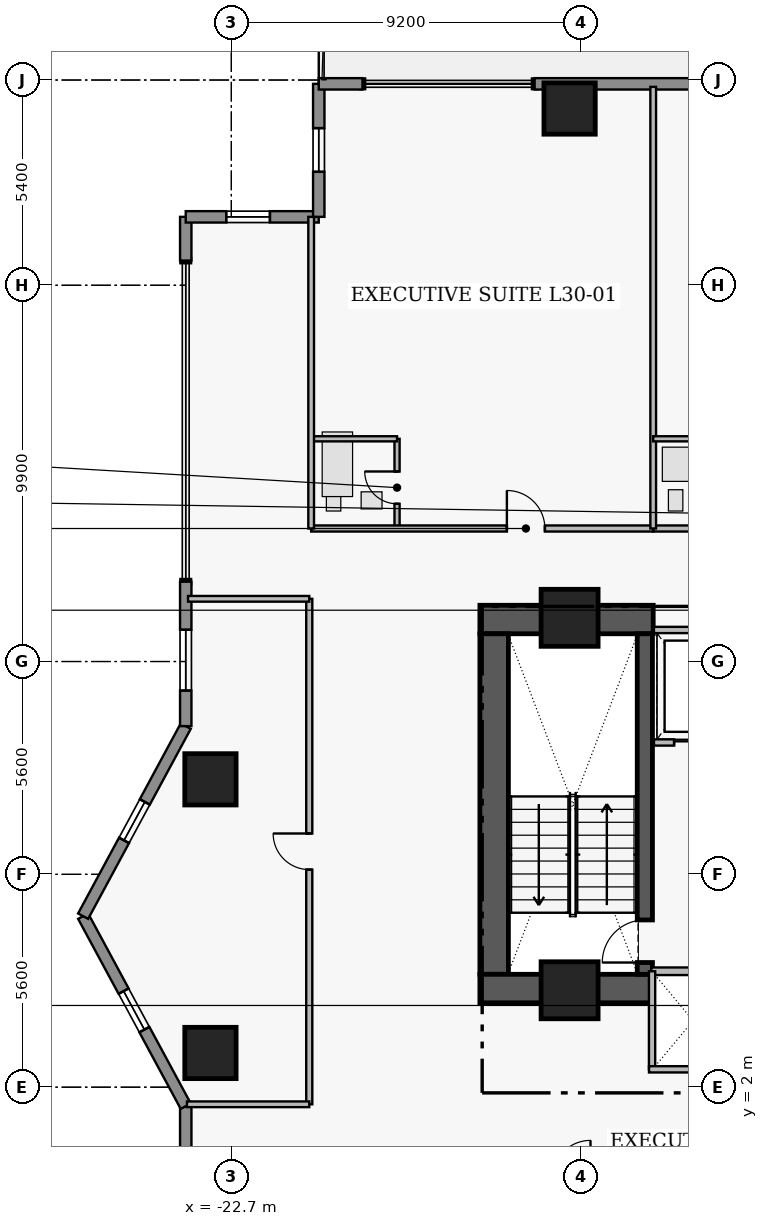
"""IFC4 building model, lengths in metres.
Left out: names, types, materials, properties, quantities, classifications, styles, units other than length and angle.
Written with IfcOpenShell. Run it as: python <this file> out.ifc"""

import sys

from ifc_helpers import new_model, si_unit, direction, frame, frame_2d, origin, origin_2d, place, context, subcontext, project, spatial, rectangle, extrude, element, fill, save


model = new_model("IFC4")
c1 = context("Model", 3, precision=1e-05, world=origin(), true_north=direction((0.0, 1.0)))
c2 = subcontext(c1, "Body", "Model", "MODEL_VIEW")
j1 = project(units=[si_unit("LENGTHUNIT", "METRE"), si_unit("PLANEANGLEUNIT", "RADIAN")], contexts=[c1])
p1 = place(None, origin())
s1 = spatial("IfcSite", under=j1, at=p1, CompositionType="ELEMENT")
p2 = place(p1, origin())
s2 = spatial("IfcBuilding", under=s1, at=p2, CompositionType="ELEMENT")
p3 = place(p2, frame((0.0, 0.0, 121.2)))
s3 = spatial("IfcBuildingStorey", under=s2, at=p3, CompositionType="ELEMENT", Elevation=121.2)
p4 = place(p3, frame((-16.16, 14.305, 0.0), z_axis=(0.0, 0.0, 1.0), x_axis=(1.0, 0.0, 0.0)))
e1 = element("IfcWall", 1, at=p4, inside=s3, PredefinedType="SHEAR", context=c2, shape_type="SweptSolid", body=[
    extrude(rectangle(XDim=4.56, YDim=0.75, at=frame_2d((2.28, 0.0))), origin(), (0.0, 0.0, 1.0), 3.46),
])
p5 = place(p3, frame((-15.785, 4.97, 0.0), z_axis=(0.0, 0.0, 1.0), x_axis=(0.0, 1.0, 0.0)))
e2 = element("IfcWall", 2, at=p5, inside=s3, PredefinedType="SHEAR", context=c2, shape_type="SweptSolid", body=[
    extrude(rectangle(XDim=8.96, YDim=0.75, at=frame_2d((4.48, 0.0))), origin(), (0.0, 0.0, 1.0), 3.46),
])
p6 = place(p3, frame((-16.16, 4.595, 0.0), z_axis=(0.0, 0.0, 1.0), x_axis=(1.0, 0.0, 0.0)))
e3 = element("IfcWall", 3, at=p6, inside=s3, PredefinedType="SHEAR", context=c2, shape_type="SweptSolid", body=[
    extrude(rectangle(XDim=4.56, YDim=0.75, at=frame_2d((2.28, 0.0))), origin(), (0.0, 0.0, 1.0), 3.46),
])
p7 = place(p3, frame((-11.82, 4.97, 0.0), z_axis=(0.0, 0.0, 1.0), x_axis=(0.0, 1.0, 0.0)))
e4 = element("IfcWall", 4, at=p7, inside=s3, PredefinedType="SHEAR", context=c2, shape_type="SweptSolid", body=[
    extrude(rectangle(XDim=8.96, YDim=0.4, at=frame_2d((4.48, 0.0))), origin(), (0.0, 0.0, 1.0), 3.46),
])
p8 = place(p7, frame((0.31, 0.0, 0.0)))
e5 = element("IfcOpeningElement", 5, at=p8, cuts=e4, PredefinedType="OPENING", context=c2, shape_type="SweptSolid", body=[
    extrude(rectangle(XDim=1.12, YDim=2.22, at=frame_2d((0.56, 1.11))), frame((0.0, 0.21, 0.0), z_axis=(0.0, -1.0, 0.0), x_axis=(1.0, 0.0, 0.0)), (0.0, 0.0, 1.0), 0.42),
])
for number, where, z_axis, x_axis in (
    (6, (-13.8, 14.35, 0.0), (0.0, 0.0, 1.0), (1.0, 0.0, 0.0)),
    (7, (-13.8, 4.55, 0.0), (0.0, 0.0, 1.0), (1.0, 0.0, 0.0)),
):
    element("IfcColumn", number, at=place(p3, frame(where, z_axis=z_axis, x_axis=x_axis)), inside=s3, PredefinedType="COLUMN", context=c2, shape_type="SweptSolid", body=[
        extrude(rectangle(XDim=1.5, YDim=1.5, at=origin_2d()), origin(), (0.0, 0.0, 1.0), 3.65),
    ])
for number, where, z_axis, x_axis in (
    (8, (-13.8, 27.75, 0.0), (0.0, 0.0, 1.0), (1.0, 0.0, 0.0)),
    (9, (-23.25, 2.9, 0.0), (0.0, 0.0, 1.0), (1.0, 0.0, 0.0)),
    (10, (-23.25, 10.1, 0.0), (0.0, 0.0, 1.0), (1.0, 0.0, 0.0)),
):
    element("IfcColumn", number, at=place(p3, frame(where, z_axis=z_axis, x_axis=x_axis)), inside=s3, PredefinedType="COLUMN", context=c2, shape_type="SweptSolid", body=[
        extrude(rectangle(XDim=1.35, YDim=1.35, at=origin_2d()), origin(), (0.0, 0.0, 1.0), 3.65),
    ])
p9 = place(p3, frame((-23.9, 0.35, 0.0), z_axis=(0.0, 0.0, 1.0), x_axis=(0.0, 1.0, 0.0)))
e11 = element("IfcWall", 11, at=p9, inside=s3, PredefinedType="STANDARD", context=c2, shape_type="SweptSolid", body=[
    extrude(rectangle(XDim=1.15, YDim=0.3, at=frame_2d((0.575, 0.0))), origin(), (0.0, 0.0, 1.0), 3.43),
])
p10 = place(p3, frame((-23.9, 1.5, 0.0), z_axis=(0.0, 0.0, 1.0), x_axis=(-0.475175525499, 0.879891027325, 0.0)))
e12 = element("IfcWall", 12, at=p10, inside=s3, PredefinedType="STANDARD", context=c2, shape_type="SweptSolid", body=[
    extrude(rectangle(XDim=5.683, YDim=0.3, at=frame_2d((2.841, 0.0))), origin(), (0.0, 0.0, 1.0), 3.43),
])
p11 = place(p10, frame((2.29, 0.0, 1.25)))
e13 = element("IfcOpeningElement", 13, at=p11, cuts=e12, PredefinedType="OPENING", context=c2, shape_type="SweptSolid", body=[
    extrude(rectangle(XDim=1.15, YDim=1.55, at=frame_2d((0.575, 0.775))), frame((0.0, 0.16, 0.0), z_axis=(0.0, -1.0, 0.0), x_axis=(1.0, 0.0, 0.0)), (0.0, 0.0, 1.0), 0.32),
])
p12 = place(p3, frame((-26.6, 6.5, 0.0), z_axis=(0.0, 0.0, 1.0), x_axis=(0.475175525499, 0.879891027325, 0.0)))
e14 = element("IfcWall", 14, at=p12, inside=s3, PredefinedType="STANDARD", context=c2, shape_type="SweptSolid", body=[
    extrude(rectangle(XDim=5.683, YDim=0.3, at=frame_2d((2.841, 0.0))), origin(), (0.0, 0.0, 1.0), 3.43),
])
p13 = place(p12, frame((2.266, 0.0, 1.25)))
e15 = element("IfcOpeningElement", 15, at=p13, cuts=e14, PredefinedType="OPENING", context=c2, shape_type="SweptSolid", body=[
    extrude(rectangle(XDim=1.15, YDim=1.55, at=frame_2d((0.575, 0.775))), frame((0.0, 0.16, 0.0), z_axis=(0.0, -1.0, 0.0), x_axis=(1.0, 0.0, 0.0)), (0.0, 0.0, 1.0), 0.32),
])
p14 = place(p3, frame((-23.9, 11.5, 0.0), z_axis=(0.0, 0.0, 1.0), x_axis=(0.0, 1.0, 0.0)))
e16 = element("IfcWall", 16, at=p14, inside=s3, PredefinedType="STANDARD", context=c2, shape_type="SweptSolid", body=[
    extrude(rectangle(XDim=3.8, YDim=0.3, at=frame_2d((1.9, 0.0))), origin(), (0.0, 0.0, 1.0), 3.43),
])
p15 = place(p14, frame((0.935, 0.0, 0.85)))
e17 = element("IfcOpeningElement", 17, at=p15, cuts=e16, PredefinedType="OPENING", context=c2, shape_type="SweptSolid", body=[
    extrude(rectangle(XDim=1.6, YDim=1.8, at=frame_2d((0.8, 0.9))), frame((0.0, 0.16, 0.0), z_axis=(0.0, -1.0, 0.0), x_axis=(1.0, 0.0, 0.0)), (0.0, 0.0, 1.0), 0.32),
])
p16 = place(p3, frame((-23.9, 23.75, 0.0), z_axis=(0.0, 0.0, 1.0), x_axis=(0.0, 1.0, 0.0)))
e18 = element("IfcWall", 18, at=p16, inside=s3, PredefinedType="STANDARD", context=c2, shape_type="SweptSolid", body=[
    extrude(rectangle(XDim=1.15, YDim=0.3, at=frame_2d((0.575, 0.0))), origin(), (0.0, 0.0, 1.0), 3.43),
])
p17 = place(p3, frame((-23.9, 24.9, 0.0), z_axis=(0.0, 0.0, 1.0), x_axis=(1.0, 0.0, 0.0)))
e19 = element("IfcWall", 19, at=p17, inside=s3, PredefinedType="STANDARD", context=c2, shape_type="SweptSolid", body=[
    extrude(rectangle(XDim=3.5, YDim=0.3, at=frame_2d((1.75, 0.0))), origin(), (0.0, 0.0, 1.0), 3.43),
])
p18 = place(p17, frame((1.065, 0.0, 1.25)))
e20 = element("IfcOpeningElement", 20, at=p18, cuts=e19, PredefinedType="OPENING", context=c2, shape_type="SweptSolid", body=[
    extrude(rectangle(XDim=1.15, YDim=1.55, at=frame_2d((0.575, 0.775))), frame((0.0, 0.16, 0.0), z_axis=(0.0, -1.0, 0.0), x_axis=(1.0, 0.0, 0.0)), (0.0, 0.0, 1.0), 0.32),
])
p19 = place(p3, frame((-20.4, 24.9, 0.0), z_axis=(0.0, 0.0, 1.0), x_axis=(0.0, 1.0, 0.0)))
e21 = element("IfcWall", 21, at=p19, inside=s3, PredefinedType="STANDARD", context=c2, shape_type="SweptSolid", body=[
    extrude(rectangle(XDim=3.5, YDim=0.3, at=frame_2d((1.75, 0.0))), origin(), (0.0, 0.0, 1.0), 3.43),
])
p20 = place(p19, frame((1.185, 0.0, 1.25)))
e22 = element("IfcOpeningElement", 22, at=p20, cuts=e21, PredefinedType="OPENING", context=c2, shape_type="SweptSolid", body=[
    extrude(rectangle(XDim=1.15, YDim=1.55, at=frame_2d((0.575, 0.775))), frame((0.0, 0.16, 0.0), z_axis=(0.0, -1.0, 0.0), x_axis=(1.0, 0.0, 0.0)), (0.0, 0.0, 1.0), 0.32),
])
p21 = place(p3, frame((-20.4, 28.4, 0.0), z_axis=(0.0, 0.0, 1.0), x_axis=(1.0, 0.0, 0.0)))
e23 = element("IfcWall", 23, at=p21, inside=s3, PredefinedType="STANDARD", context=c2, shape_type="SweptSolid", body=[
    extrude(rectangle(XDim=1.15, YDim=0.3, at=frame_2d((0.575, 0.0))), origin(), (0.0, 0.0, 1.0), 3.43),
])
p22 = place(p3, frame((-14.72, 28.4, 0.0), z_axis=(0.0, 0.0, 1.0), x_axis=(1.0, 0.0, 0.0)))
e24 = element("IfcWall", 24, at=p22, inside=s3, PredefinedType="STANDARD", context=c2, shape_type="SweptSolid", body=[
    extrude(rectangle(XDim=11.04, YDim=0.3, at=frame_2d((5.52, 0.0))), origin(), (0.0, 0.0, 1.0), 3.43),
])
p23 = place(p22, frame((4.98, 0.0, 0.85)))
e25 = element("IfcOpeningElement", 25, at=p23, cuts=e24, PredefinedType="OPENING", context=c2, shape_type="SweptSolid", body=[
    extrude(rectangle(XDim=1.6, YDim=1.8, at=frame_2d((0.8, 0.9))), frame((0.0, 0.16, 0.0), z_axis=(0.0, -1.0, 0.0), x_axis=(1.0, 0.0, 0.0)), (0.0, 0.0, 1.0), 0.32),
])
p24 = place(p22, frame((7.325, 0.0, 0.85)))
e26 = element("IfcOpeningElement", 26, at=p24, cuts=e24, PredefinedType="OPENING", context=c2, shape_type="SweptSolid", body=[
    extrude(rectangle(XDim=1.6, YDim=1.8, at=frame_2d((0.8, 0.9))), frame((0.0, 0.16, 0.0), z_axis=(0.0, -1.0, 0.0), x_axis=(1.0, 0.0, 0.0)), (0.0, 0.0, 1.0), 0.32),
])
p25 = place(p3, frame((-11.58, 11.07, 0.0), z_axis=(0.0, 0.0, 1.0), x_axis=(1.0, 0.0, 0.0)))
e27 = element("IfcWall", 27, at=p25, inside=s3, PredefinedType="PARTITIONING", context=c2, shape_type="SweptSolid", body=[
    extrude(rectangle(XDim=2.16, YDim=0.165, at=frame_2d((1.08, 0.0))), origin(), (0.0, 0.0, 1.0), 3.43),
])
p26 = place(p25, frame((0.53, 0.0, 0.0)))
e28 = element("IfcOpeningElement", 28, at=p26, cuts=e27, PredefinedType="OPENING", context=c2, shape_type="SweptSolid", body=[
    extrude(rectangle(XDim=1.15, YDim=2.25, at=frame_2d((0.575, 1.125))), frame((0.0, 0.093, 0.0), z_axis=(0.0, -1.0, 0.0), x_axis=(1.0, 0.0, 0.0)), (0.0, 0.0, 1.0), 0.185),
])
p27 = place(p3, frame((-18.34, 16.7, 0.0), z_axis=(0.0, 0.0, 1.0), x_axis=(0.0, 1.0, 0.0)))
e29 = element("IfcWall", 29, at=p27, inside=s3, PredefinedType="PLUMBINGWALL", context=c2, shape_type="SweptSolid", body=[
    extrude(rectangle(XDim=2.36, YDim=0.135, at=frame_2d((1.18, 0.0))), origin(), (0.0, 0.0, 1.0), 3.43),
])
p28 = place(p27, frame((0.65, 0.0, 0.0)))
e30 = element("IfcOpeningElement", 30, at=p28, cuts=e29, PredefinedType="OPENING", context=c2, shape_type="SweptSolid", body=[
    extrude(rectangle(XDim=0.85, YDim=2.1, at=frame_2d((0.425, 1.05))), frame((0.0, 0.077, 0.0), z_axis=(0.0, -1.0, 0.0), x_axis=(1.0, 0.0, 0.0)), (0.0, 0.0, 1.0), 0.155),
])
p29 = place(p3, frame((-20.6, 16.7, 0.0), z_axis=(0.0, 0.0, 1.0), x_axis=(1.0, 0.0, 0.0)))
e31 = element("IfcWall", 31, at=p29, inside=s3, PredefinedType="PARTITIONING", context=c2, shape_type="SweptSolid", body=[
    extrude(rectangle(XDim=9.0, YDim=0.16, at=frame_2d((4.5, 0.0))), origin(), (0.0, 0.0, 1.0), 2.973),
])
p30 = place(p29, frame((5.15, 0.0, 0.0)))
e32 = element("IfcOpeningElement", 32, at=p30, cuts=e31, PredefinedType="OPENING", context=c2, shape_type="SweptSolid", body=[
    extrude(rectangle(XDim=1.0, YDim=2.15, at=frame_2d((0.5, 1.075))), frame((0.0, 0.09, 0.0), z_axis=(0.0, -1.0, 0.0), x_axis=(1.0, 0.0, 0.0)), (0.0, 0.0, 1.0), 0.18),
])
p31 = place(p3, frame((-11.6, 16.7, 0.0), z_axis=(0.0, 0.0, 1.0), x_axis=(1.0, 0.0, 0.0)))
e33 = element("IfcWall", 33, at=p31, inside=s3, PredefinedType="PARTITIONING", context=c2, shape_type="SweptSolid", body=[
    extrude(rectangle(XDim=7.0, YDim=0.16, at=frame_2d((3.5, 0.0))), origin(), (0.0, 0.0, 1.0), 2.973),
])
p32 = place(p31, frame((4.15, 0.0, 0.0)))
e34 = element("IfcOpeningElement", 34, at=p32, cuts=e33, PredefinedType="OPENING", context=c2, shape_type="SweptSolid", body=[
    extrude(rectangle(XDim=1.0, YDim=2.15, at=frame_2d((0.5, 1.075))), frame((0.0, 0.09, 0.0), z_axis=(0.0, -1.0, 0.0), x_axis=(1.0, 0.0, 0.0)), (0.0, 0.0, 1.0), 0.18),
])
p33 = place(p3, frame((-20.65, 1.55, 0.0), z_axis=(0.0, 0.0, 1.0), x_axis=(0.0, 1.0, 0.0)))
e35 = element("IfcWall", 35, at=p33, inside=s3, PredefinedType="PARTITIONING", context=c2, shape_type="SweptSolid", body=[
    extrude(rectangle(XDim=13.3, YDim=0.16, at=frame_2d((6.65, 0.0))), origin(), (0.0, 0.0, 1.0), 3.43),
])
p34 = place(p33, frame((6.175, 0.0, 0.0)))
e36 = element("IfcOpeningElement", 36, at=p34, cuts=e35, PredefinedType="OPENING", context=c2, shape_type="SweptSolid", body=[
    extrude(rectangle(XDim=0.95, YDim=2.15, at=frame_2d((0.475, 1.075))), frame((0.0, 0.09, 0.0), z_axis=(0.0, -1.0, 0.0), x_axis=(1.0, 0.0, 0.0)), (0.0, 0.0, 1.0), 0.18),
])
p35 = place(p3, frame((-11.65, 5.05, 0.0), z_axis=(0.0, 0.0, 1.0), x_axis=(1.0, 0.0, 0.0)))
e37 = element("IfcWall", 37, at=p35, inside=s3, PredefinedType="PARTITIONING", context=c2, shape_type="SweptSolid", body=[
    extrude(rectangle(XDim=2.85, YDim=0.2, at=frame_2d((1.425, 0.0))), origin(), (0.0, 0.0, 1.0), 3.43),
])
p36 = place(p3, frame((-11.58, 14.03, 0.0), z_axis=(0.0, 0.0, 1.0), x_axis=(1.0, 0.0, 0.0)))
e38 = element("IfcWall", 38, at=p36, inside=s3, PredefinedType="PARTITIONING", context=c2, shape_type="SweptSolid", body=[
    extrude(rectangle(XDim=2.16, YDim=0.165, at=frame_2d((1.08, 0.0))), origin(), (0.0, 0.0, 1.0), 3.43),
])
p37 = place(p3, frame((-11.63, 2.47, 0.0), z_axis=(0.0, 0.0, 1.0), x_axis=(0.0, 1.0, 0.0)))
e39 = element("IfcWall", 39, at=p37, inside=s3, PredefinedType="PARTITIONING", context=c2, shape_type="SweptSolid", body=[
    extrude(rectangle(XDim=2.58, YDim=0.165, at=frame_2d((1.29, 0.0))), origin(), (0.0, 0.0, 1.0), 3.43),
])
p38 = place(p3, frame((-11.71, 2.47, 0.0), z_axis=(0.0, 0.0, 1.0), x_axis=(1.0, 0.0, 0.0)))
e40 = element("IfcWall", 40, at=p38, inside=s3, PredefinedType="PARTITIONING", context=c2, shape_type="SweptSolid", body=[
    extrude(rectangle(XDim=2.31, YDim=0.165, at=frame_2d((1.155, 0.0))), origin(), (0.0, 0.0, 1.0), 2.03),
])
p39 = place(p3, frame((-20.6, 19.06, 0.0), z_axis=(0.0, 0.0, 1.0), x_axis=(1.0, 0.0, 0.0)))
e41 = element("IfcWall", 41, at=p39, inside=s3, PredefinedType="PLUMBINGWALL", context=c2, shape_type="SweptSolid", body=[
    extrude(rectangle(XDim=2.26, YDim=0.135, at=frame_2d((1.13, 0.0))), origin(), (0.0, 0.0, 1.0), 3.43),
])
p40 = place(p3, frame((-20.6, 16.7, 0.0), z_axis=(0.0, 0.0, 1.0), x_axis=(0.0, 1.0, 0.0)))
e42 = element("IfcWall", 42, at=p40, inside=s3, PredefinedType="PARTITIONING", context=c2, shape_type="SweptSolid", body=[
    extrude(rectangle(XDim=8.2, YDim=0.15, at=frame_2d((4.1, 0.0))), origin(), (0.0, 0.0, 1.0), 3.43),
])
p41 = place(p3, frame((-11.6, 16.7, 0.0), z_axis=(0.0, 0.0, 1.0), x_axis=(0.0, 1.0, 0.0)))
e43 = element("IfcWall", 43, at=p41, inside=s3, PredefinedType="PARTITIONING", context=c2, shape_type="SweptSolid", body=[
    extrude(rectangle(XDim=11.62, YDim=0.15, at=frame_2d((5.81, 0.0))), origin(), (0.0, 0.0, 1.0), 3.43),
])
p42 = place(p3, frame((-11.6, 19.06, 0.0), z_axis=(0.0, 0.0, 1.0), x_axis=(1.0, 0.0, 0.0)))
e44 = element("IfcWall", 44, at=p42, inside=s3, PredefinedType="PLUMBINGWALL", context=c2, shape_type="SweptSolid", body=[
    extrude(rectangle(XDim=2.26, YDim=0.135, at=frame_2d((1.13, 0.0))), origin(), (0.0, 0.0, 1.0), 2.973),
])
p43 = place(p3, frame((-23.867, 1.55, 0.0), z_axis=(0.0, 0.0, 1.0), x_axis=(1.0, 0.0, 0.0)))
e45 = element("IfcWall", 45, at=p43, inside=s3, PredefinedType="PARTITIONING", context=c2, shape_type="SweptSolid", body=[
    extrude(rectangle(XDim=3.217, YDim=0.15, at=frame_2d((1.608, 0.0))), origin(), (0.0, 0.0, 1.0), 3.43),
])
p44 = place(p3, frame((-23.84, 14.85, 0.0), z_axis=(0.0, 0.0, 1.0), x_axis=(1.0, 0.0, 0.0)))
e46 = element("IfcWall", 46, at=p44, inside=s3, PredefinedType="PARTITIONING", context=c2, shape_type="SweptSolid", body=[
    extrude(rectangle(XDim=3.19, YDim=0.15, at=frame_2d((1.595, 0.0))), origin(), (0.0, 0.0, 1.0), 3.43),
])
p45 = place(p11, origin())
e47 = element("IfcWindow", 47, at=p45, inside=s3, PartitioningType="SINGLE_PANEL", PredefinedType="WINDOW", context=c2, shape_type="SweptSolid", body=[
    extrude(rectangle(XDim=1.15, YDim=1.55, at=frame_2d((0.575, 0.775))), frame((0.0, 0.03, 0.0), z_axis=(0.0, -1.0, 0.0), x_axis=(1.0, 0.0, 0.0)), (0.0, 0.0, 1.0), 0.06),
])
fill(e13, e47)
p46 = place(p13, origin())
e48 = element("IfcWindow", 48, at=p46, inside=s3, PartitioningType="SINGLE_PANEL", PredefinedType="WINDOW", context=c2, shape_type="SweptSolid", body=[
    extrude(rectangle(XDim=1.15, YDim=1.55, at=frame_2d((0.575, 0.775))), frame((0.0, 0.03, 0.0), z_axis=(0.0, -1.0, 0.0), x_axis=(1.0, 0.0, 0.0)), (0.0, 0.0, 1.0), 0.06),
])
fill(e15, e48)
p47 = place(p15, origin())
e49 = element("IfcWindow", 49, at=p47, inside=s3, PartitioningType="SINGLE_PANEL", PredefinedType="WINDOW", context=c2, shape_type="SweptSolid", body=[
    extrude(rectangle(XDim=1.6, YDim=1.8, at=frame_2d((0.8, 0.9))), frame((0.0, 0.03, 0.0), z_axis=(0.0, -1.0, 0.0), x_axis=(1.0, 0.0, 0.0)), (0.0, 0.0, 1.0), 0.06),
])
fill(e17, e49)
p48 = place(p18, origin())
e50 = element("IfcWindow", 50, at=p48, inside=s3, PartitioningType="SINGLE_PANEL", PredefinedType="WINDOW", context=c2, shape_type="SweptSolid", body=[
    extrude(rectangle(XDim=1.15, YDim=1.55, at=frame_2d((0.575, 0.775))), frame((0.0, 0.03, 0.0), z_axis=(0.0, -1.0, 0.0), x_axis=(1.0, 0.0, 0.0)), (0.0, 0.0, 1.0), 0.06),
])
fill(e20, e50)
p49 = place(p20, origin())
e51 = element("IfcWindow", 51, at=p49, inside=s3, PartitioningType="SINGLE_PANEL", PredefinedType="WINDOW", context=c2, shape_type="SweptSolid", body=[
    extrude(rectangle(XDim=1.15, YDim=1.55, at=frame_2d((0.575, 0.775))), frame((0.0, 0.03, 0.0), z_axis=(0.0, -1.0, 0.0), x_axis=(1.0, 0.0, 0.0)), (0.0, 0.0, 1.0), 0.06),
])
fill(e22, e51)
p50 = place(p8, origin())
e52 = element("IfcDoor", 52, at=p50, inside=s3, OperationType="SINGLE_SWING_LEFT", PredefinedType="DOOR", context=c2, shape_type="SweptSolid", body=[
    extrude(rectangle(XDim=1.12, YDim=2.22, at=frame_2d((0.56, 1.11))), frame((0.0, 0.025, 0.0), z_axis=(0.0, -1.0, 0.0), x_axis=(1.0, 0.0, 0.0)), (0.0, 0.0, 1.0), 0.05),
])
fill(e5, e52)
p51 = place(p26, origin())
e53 = element("IfcDoor", 53, at=p51, inside=s3, OperationType="SLIDING_TO_LEFT", PredefinedType="DOOR", context=c2, shape_type="SweptSolid", body=[
    extrude(rectangle(XDim=1.15, YDim=2.25, at=frame_2d((0.575, 1.125))), frame((0.0, 0.025, 0.0), z_axis=(0.0, -1.0, 0.0), x_axis=(1.0, 0.0, 0.0)), (0.0, 0.0, 1.0), 0.05),
])
fill(e28, e53)
p52 = place(p28, origin())
e54 = element("IfcDoor", 54, at=p52, inside=s3, OperationType="SINGLE_SWING_RIGHT", PredefinedType="DOOR", context=c2, shape_type="SweptSolid", body=[
    extrude(rectangle(XDim=0.85, YDim=2.1, at=frame_2d((0.425, 1.05))), frame((0.0, 0.025, 0.0), z_axis=(0.0, -1.0, 0.0), x_axis=(1.0, 0.0, 0.0)), (0.0, 0.0, 1.0), 0.05),
])
fill(e30, e54)
p53 = place(p30, origin())
e55 = element("IfcDoor", 55, at=p53, inside=s3, OperationType="SINGLE_SWING_LEFT", PredefinedType="DOOR", context=c2, shape_type="SweptSolid", body=[
    extrude(rectangle(XDim=1.0, YDim=2.15, at=frame_2d((0.5, 1.075))), frame((0.0, 0.025, 0.0), z_axis=(0.0, -1.0, 0.0), x_axis=(1.0, 0.0, 0.0)), (0.0, 0.0, 1.0), 0.05),
])
fill(e32, e55)
p54 = place(p34, origin())
e56 = element("IfcDoor", 56, at=p54, inside=s3, OperationType="SINGLE_SWING_RIGHT", PredefinedType="DOOR", context=c2, shape_type="SweptSolid", body=[
    extrude(rectangle(XDim=0.95, YDim=2.15, at=frame_2d((0.475, 1.075))), frame((0.0, 0.025, 0.0), z_axis=(0.0, -1.0, 0.0), x_axis=(1.0, 0.0, 0.0)), (0.0, 0.0, 1.0), 0.05),
])
fill(e36, e56)
save(model, sys.argv[1])
